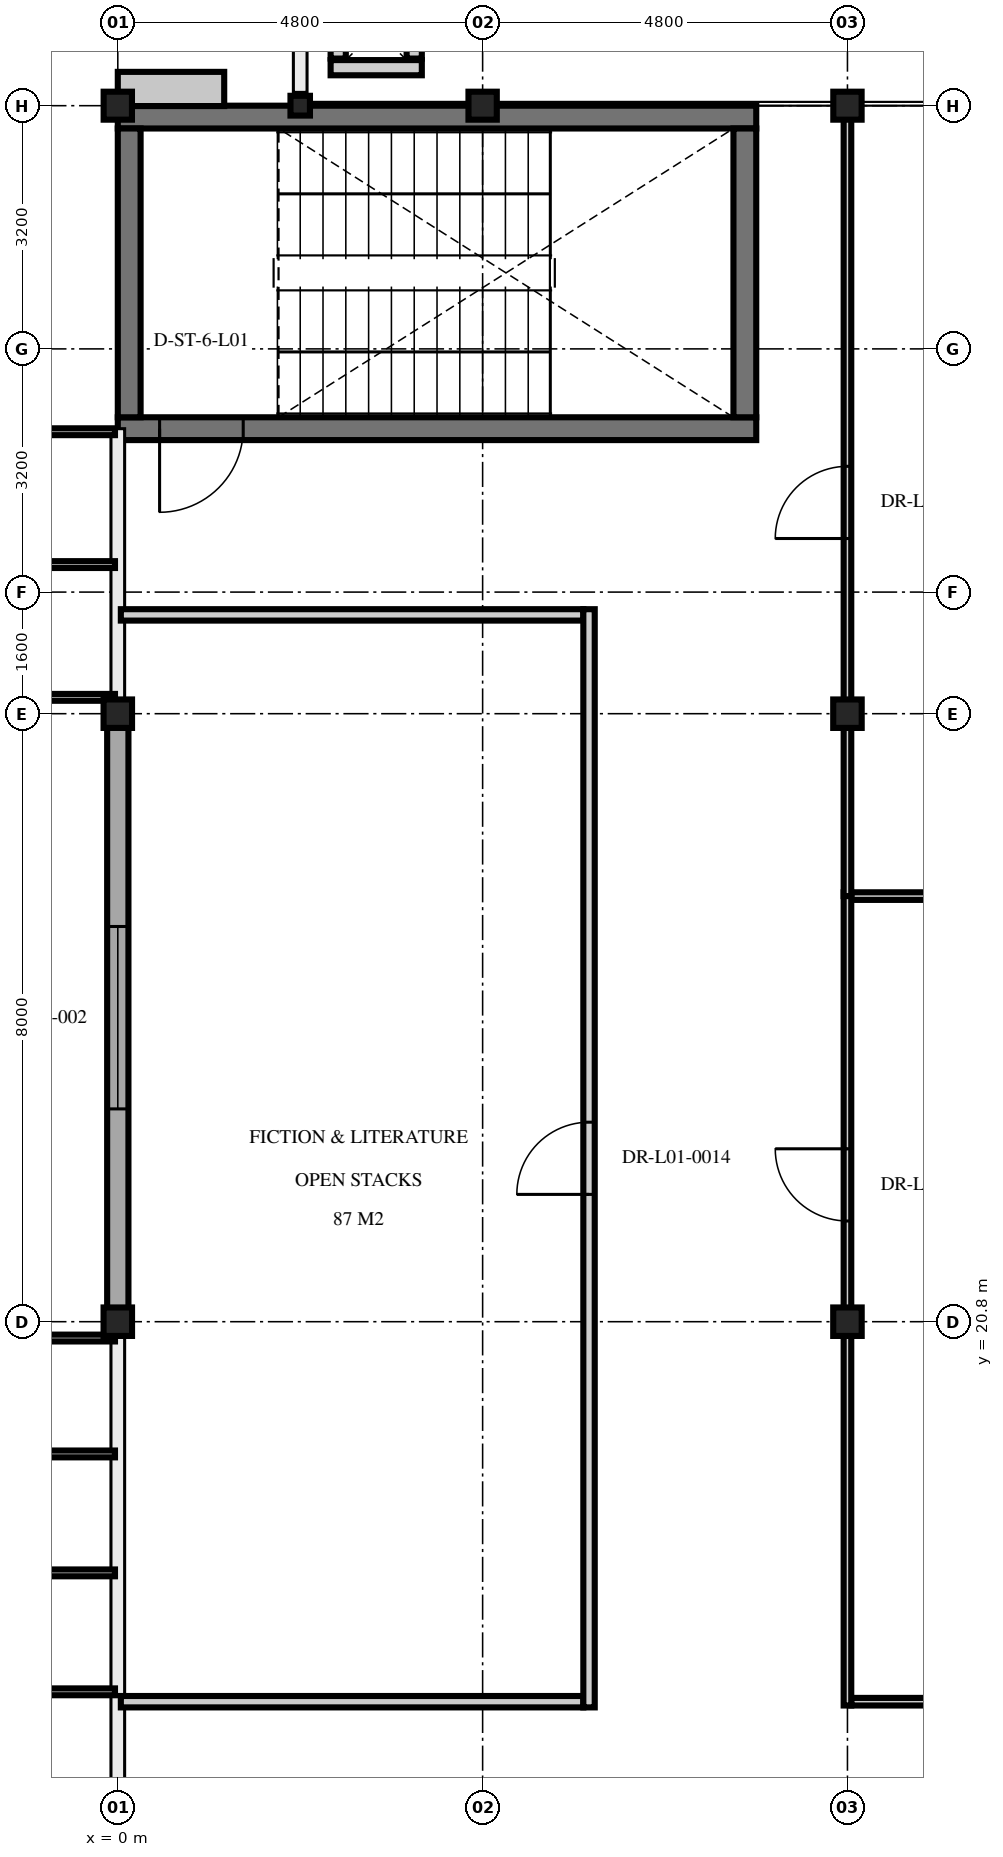
"""IFC4 building model, lengths in metres.
Left out: names, types, materials, properties, quantities, classifications, styles, units other than length and angle.
Written with IfcOpenShell. Run it as: python <this file> out.ifc"""

import sys

from ifc_helpers import new_model, si_unit, direction, frame, frame_2d, origin, origin_2d, place, context, subcontext, project, spatial, rectangle, i_section, extrude, element, fill, save


model = new_model("IFC4")
c1 = context("Model", 3, precision=1e-05, world=origin(), true_north=direction((0.0, 1.0)))
c2 = subcontext(c1, "Body", "Model", "MODEL_VIEW")
j1 = project(units=[si_unit("LENGTHUNIT", "METRE"), si_unit("PLANEANGLEUNIT", "RADIAN")], contexts=[c1])
p1 = place(None, origin())
s1 = spatial("IfcSite", under=j1, at=p1, CompositionType="ELEMENT")
p2 = place(p1, origin())
s2 = spatial("IfcBuilding", under=s1, at=p2, CompositionType="ELEMENT")
p3 = place(p2, frame((0.0, 0.0, 5.1)))
s3 = spatial("IfcBuildingStorey", under=s2, at=p3, CompositionType="ELEMENT", Elevation=5.1)
for number, where, z_axis, x_axis in (
    (1, (0.0, 36.8, 0.0), (0.0, 0.0, 1.0), (1.0, 0.0, 0.0)),
    (2, (4.8, 36.8, 0.0), (0.0, 0.0, 1.0), (1.0, 0.0, 0.0)),
    (3, (9.6, 36.8, 0.0), (0.0, 0.0, 1.0), (1.0, 0.0, 0.0)),
):
    element("IfcColumn", number, at=place(p3, frame(where, z_axis=z_axis, x_axis=x_axis)), inside=s3, PredefinedType="COLUMN", context=c2, shape_type="SweptSolid", body=[
        extrude(i_section(OverallWidth=0.373, OverallDepth=0.368, WebThickness=0.014, FlangeThickness=0.024, at=origin_2d()), origin(), (0.0, 0.0, 1.0), 4.5),
    ])
for number, where, z_axis, x_axis in (
    (4, (0.0, 20.8, 0.0), (0.0, 0.0, 1.0), (1.0, 0.0, 0.0)),
    (5, (0.0, 28.8, 0.0), (0.0, 0.0, 1.0), (1.0, 0.0, 0.0)),
    (6, (9.6, 20.8, 0.0), (0.0, 0.0, 1.0), (1.0, 0.0, 0.0)),
    (7, (9.6, 28.8, 0.0), (0.0, 0.0, 1.0), (1.0, 0.0, 0.0)),
):
    element("IfcColumn", number, at=place(p3, frame(where, z_axis=z_axis, x_axis=x_axis)), inside=s3, PredefinedType="COLUMN", context=c2, shape_type="SweptSolid", body=[
        extrude(i_section(OverallWidth=0.375, OverallDepth=0.375, WebThickness=0.017, FlangeThickness=0.027, at=origin_2d()), origin(), (0.0, 0.0, 1.0), 4.5),
    ])
p4 = place(p3, frame((2.4, 36.8, 0.0), z_axis=(0.0, 0.0, 1.0), x_axis=(1.0, 0.0, 0.0)))
e8 = element("IfcColumn", 8, at=p4, inside=s3, PredefinedType="COLUMN", context=c2, shape_type="SweptSolid", body=[
    extrude(i_section(OverallWidth=0.256, OverallDepth=0.26, WebThickness=0.01, FlangeThickness=0.017, at=origin_2d()), origin(), (0.0, 0.0, 1.0), 4.5),
])
p5 = place(p3, frame((8.4, 32.55, 0.0), z_axis=(0.0, 0.0, 1.0), x_axis=(-1.0, 0.0, 0.0)))
e9 = element("IfcWall", 9, at=p5, inside=s3, PredefinedType="SHEAR", context=c2, shape_type="SweptSolid", body=[
    extrude(rectangle(XDim=8.4, YDim=0.3, at=frame_2d((4.2, 0.0))), origin(), (0.0, 0.0, 1.0), 4.29),
])
p6 = place(p5, frame((6.75, 0.0, 0.0)))
e10 = element("IfcOpeningElement", 10, at=p6, cuts=e9, PredefinedType="OPENING", context=c2, shape_type="SweptSolid", body=[
    extrude(rectangle(XDim=1.1, YDim=2.2, at=frame_2d((0.55, 1.1))), frame((0.0, 0.16, 0.0), z_axis=(0.0, -1.0, 0.0), x_axis=(1.0, 0.0, 0.0)), (0.0, 0.0, 1.0), 0.32),
])
p7 = place(p3, frame((0.0, 36.65, 0.0), z_axis=(0.0, 0.0, 1.0), x_axis=(1.0, 0.0, 0.0)))
e11 = element("IfcWall", 11, at=p7, inside=s3, PredefinedType="SHEAR", context=c2, shape_type="SweptSolid", body=[
    extrude(rectangle(XDim=8.4, YDim=0.3, at=frame_2d((4.2, 0.0))), origin(), (0.0, 0.0, 1.0), 4.29),
])
for number, where, z_axis, x_axis in (
    (12, (0.15, 32.7, 0.0), (0.0, 0.0, 1.0), (0.0, 1.0, 0.0)),
    (13, (8.25, 36.5, 0.0), (0.0, 0.0, 1.0), (0.0, -1.0, 0.0)),
):
    element("IfcWall", number, at=place(p3, frame(where, z_axis=z_axis, x_axis=x_axis)), inside=s3, PredefinedType="SHEAR", context=c2, shape_type="SweptSolid", body=[
        extrude(rectangle(XDim=3.8, YDim=0.3, at=frame_2d((1.9, 0.0))), origin(), (0.0, 0.0, 1.0), 4.29),
    ])
p8 = place(p3, frame((4.0, 37.3, 0.0), z_axis=(0.0, 0.0, 1.0), x_axis=(-1.0, 0.0, 0.0)))
e14 = element("IfcWall", 14, at=p8, inside=s3, PredefinedType="PARTITIONING", context=c2, shape_type="SweptSolid", body=[
    extrude(rectangle(XDim=1.2, YDim=0.2, at=frame_2d((0.6, 0.0))), origin(), (0.0, 0.0, 1.0), 3.79),
])
for number, where, z_axis, x_axis in (
    (15, (2.9, 37.42, 0.0), (0.0, 0.0, 1.0), (0.0, 1.0, 0.0)),
    (16, (3.9, 38.18, 0.0), (0.0, 0.0, 1.0), (0.0, -1.0, 0.0)),
):
    element("IfcWall", number, at=place(p3, frame(where, z_axis=z_axis, x_axis=x_axis)), inside=s3, PredefinedType="PARTITIONING", context=c2, shape_type="SweptSolid", body=[
        extrude(rectangle(XDim=0.76, YDim=0.2, at=frame_2d((0.38, 0.0))), origin(), (0.0, 0.0, 1.0), 3.79),
    ])
p9 = place(p3, frame((0.0, 20.715, 0.0), z_axis=(0.0, 0.0, 1.0), x_axis=(0.0, 1.0, 0.0)))
e17 = element("IfcWall", 17, at=p9, inside=s3, PredefinedType="SOLIDWALL", context=c2, shape_type="SweptSolid", body=[
    extrude(rectangle(XDim=8.17, YDim=0.28, at=frame_2d((4.085, 0.0))), origin(), (0.0, 0.0, 1.0), 3.765),
])
p10 = place(p9, frame((2.885, 0.0, 0.95)))
e18 = element("IfcOpeningElement", 18, at=p10, cuts=e17, PredefinedType="OPENING", context=c2, shape_type="SweptSolid", body=[
    extrude(rectangle(XDim=2.4, YDim=2.1, at=frame_2d((1.2, 1.05))), frame((0.0, 0.15, 0.0), z_axis=(0.0, -1.0, 0.0), x_axis=(1.0, 0.0, 0.0)), (0.0, 0.0, 1.0), 0.3),
])
for number, where, z_axis, x_axis in (
    (19, (0.04, 15.8, 0.0), (0.0, 0.0, 1.0), (1.0, 0.0, 0.0)),
    (20, (0.04, 30.1, 0.0), (0.0, 0.0, 1.0), (1.0, 0.0, 0.0)),
):
    element("IfcWall", number, at=place(p3, frame(where, z_axis=z_axis, x_axis=x_axis)), inside=s3, PredefinedType="PARTITIONING", context=c2, shape_type="SweptSolid", body=[
        extrude(rectangle(XDim=6.085, YDim=0.15, at=frame_2d((3.042, 0.0))), origin(), (0.0, 0.0, 1.0), 3.852),
    ])
p11 = place(p3, frame((6.2, 15.725, 0.0), z_axis=(0.0, 0.0, 1.0), x_axis=(0.0, 1.0, 0.0)))
e21 = element("IfcWall", 21, at=p11, inside=s3, PredefinedType="PARTITIONING", context=c2, shape_type="SweptSolid", body=[
    extrude(rectangle(XDim=14.45, YDim=0.15, at=frame_2d((7.225, 0.0))), origin(), (0.0, 0.0, 1.0), 3.765),
])
p12 = place(p11, frame((6.75, 0.0, 0.0)))
e22 = element("IfcOpeningElement", 22, at=p12, cuts=e21, PredefinedType="OPENING", context=c2, shape_type="SweptSolid", body=[
    extrude(rectangle(XDim=0.95, YDim=2.15, at=frame_2d((0.475, 1.075))), frame((0.0, 0.085, 0.0), z_axis=(0.0, -1.0, 0.0), x_axis=(1.0, 0.0, 0.0)), (0.0, 0.0, 1.0), 0.17),
])
for number, where, z_axis, x_axis in (
    (23, (9.65, 15.8, 0.0), (0.0, 0.0, 1.0), (1.0, 0.0, 0.0)),
    (24, (9.65, 26.4, 0.0), (0.0, 0.0, 1.0), (1.0, 0.0, 0.0)),
):
    element("IfcWall", number, at=place(p3, frame(where, z_axis=z_axis, x_axis=x_axis)), inside=s3, PredefinedType="MOVABLE", context=c2, shape_type="SweptSolid", body=[
        extrude(rectangle(XDim=16.5, YDim=0.1, at=frame_2d((8.25, 0.0))), origin(), (0.0, 0.0, 1.0), 3.852),
    ])
p13 = place(p3, frame((9.6, 15.75, 0.0), z_axis=(0.0, 0.0, 1.0), x_axis=(0.0, 1.0, 0.0)))
e25 = element("IfcWall", 25, at=p13, inside=s3, PredefinedType="MOVABLE", context=c2, shape_type="SweptSolid", body=[
    extrude(rectangle(XDim=10.7, YDim=0.1, at=frame_2d((5.35, 0.0))), origin(), (0.0, 0.0, 1.0), 3.765),
])
p14 = place(p13, frame((6.375, 0.0, 0.0)))
e26 = element("IfcOpeningElement", 26, at=p14, cuts=e25, PredefinedType="OPENING", context=c2, shape_type="SweptSolid", body=[
    extrude(rectangle(XDim=0.95, YDim=2.15, at=frame_2d((0.475, 1.075))), frame((0.0, 0.06, 0.0), z_axis=(0.0, -1.0, 0.0), x_axis=(1.0, 0.0, 0.0)), (0.0, 0.0, 1.0), 0.12),
])
p15 = place(p3, frame((9.6, 26.4, 0.0), z_axis=(0.0, 0.0, 1.0), x_axis=(0.0, 1.0, 0.0)))
e27 = element("IfcWall", 27, at=p15, inside=s3, PredefinedType="MOVABLE", context=c2, shape_type="SweptSolid", body=[
    extrude(rectangle(XDim=10.36, YDim=0.1, at=frame_2d((5.18, 0.0))), origin(), (0.0, 0.0, 1.0), 3.765),
])
p16 = place(p15, frame((4.705, 0.0, 0.0)))
e28 = element("IfcOpeningElement", 28, at=p16, cuts=e27, PredefinedType="OPENING", context=c2, shape_type="SweptSolid", body=[
    extrude(rectangle(XDim=0.95, YDim=2.15, at=frame_2d((0.475, 1.075))), frame((0.0, 0.06, 0.0), z_axis=(0.0, -1.0, 0.0), x_axis=(1.0, 0.0, 0.0)), (0.0, 0.0, 1.0), 0.12),
])
p17 = place(p6, origin())
e29 = element("IfcDoor", 29, at=p17, inside=s3, OperationType="SINGLE_SWING_RIGHT", PredefinedType="DOOR", context=c2, shape_type="SweptSolid", body=[
    extrude(rectangle(XDim=1.1, YDim=2.2, at=frame_2d((0.55, 1.1))), frame((0.0, 0.025, 0.0), z_axis=(0.0, -1.0, 0.0), x_axis=(1.0, 0.0, 0.0)), (0.0, 0.0, 1.0), 0.05),
])
fill(e10, e29)
p18 = place(p10, origin())
e30 = element("IfcWindow", 30, at=p18, inside=s3, PartitioningType="SINGLE_PANEL", PredefinedType="WINDOW", context=c2, shape_type="SweptSolid", body=[
    extrude(rectangle(XDim=2.4, YDim=2.1, at=frame_2d((1.2, 1.05))), frame((0.0, 0.03, 0.0), z_axis=(0.0, -1.0, 0.0), x_axis=(1.0, 0.0, 0.0)), (0.0, 0.0, 1.0), 0.06),
])
fill(e18, e30)
p19 = place(p12, origin())
e31 = element("IfcDoor", 31, at=p19, inside=s3, OperationType="SINGLE_SWING_LEFT", PredefinedType="DOOR", context=c2, shape_type="SweptSolid", body=[
    extrude(rectangle(XDim=0.95, YDim=2.15, at=frame_2d((0.475, 1.075))), frame((0.0, 0.025, 0.0), z_axis=(0.0, -1.0, 0.0), x_axis=(1.0, 0.0, 0.0)), (0.0, 0.0, 1.0), 0.05),
])
fill(e22, e31)
p20 = place(p14, origin())
e32 = element("IfcDoor", 32, at=p20, inside=s3, OperationType="SINGLE_SWING_RIGHT", PredefinedType="DOOR", context=c2, shape_type="SweptSolid", body=[
    extrude(rectangle(XDim=0.95, YDim=2.15, at=frame_2d((0.475, 1.075))), frame((0.0, 0.025, 0.0), z_axis=(0.0, -1.0, 0.0), x_axis=(1.0, 0.0, 0.0)), (0.0, 0.0, 1.0), 0.05),
])
fill(e26, e32)
p21 = place(p16, origin())
e33 = element("IfcDoor", 33, at=p21, inside=s3, OperationType="SINGLE_SWING_LEFT", PredefinedType="DOOR", context=c2, shape_type="SweptSolid", body=[
    extrude(rectangle(XDim=0.95, YDim=2.15, at=frame_2d((0.475, 1.075))), frame((0.0, 0.025, 0.0), z_axis=(0.0, -1.0, 0.0), x_axis=(1.0, 0.0, 0.0)), (0.0, 0.0, 1.0), 0.05),
])
fill(e28, e33)
save(model, sys.argv[1])
